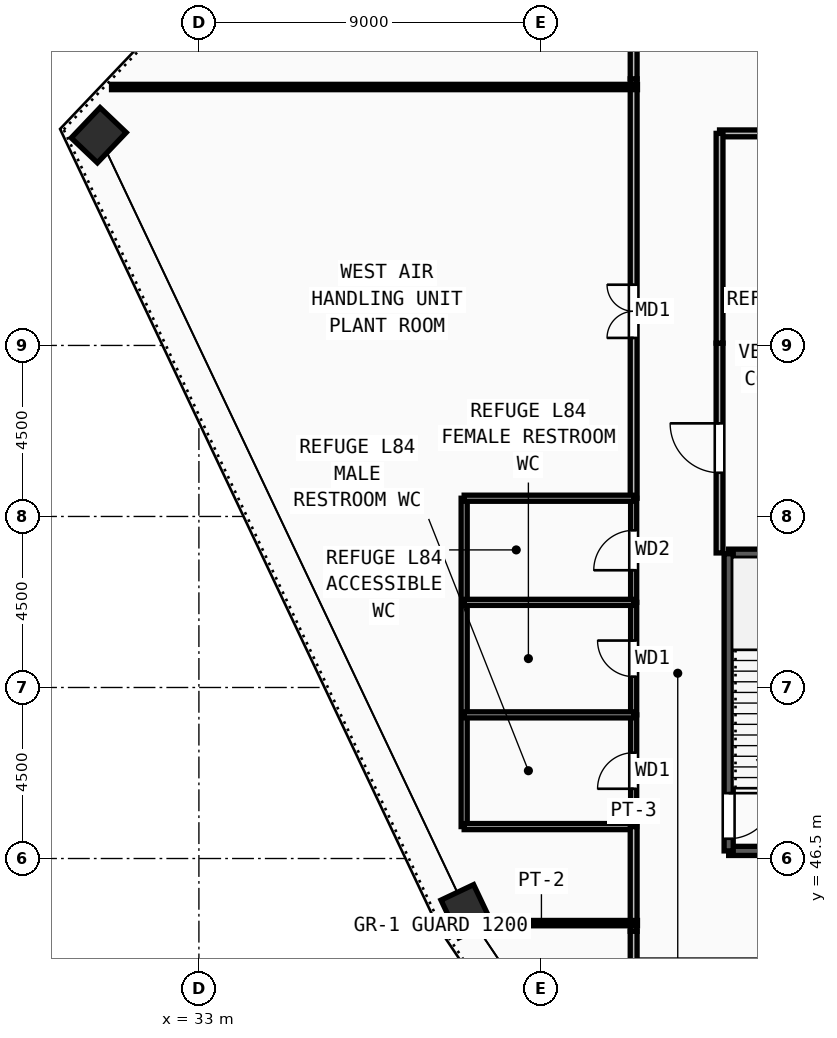
"""IFC4 building model, lengths in metres.
Left out: names, types, materials, properties, quantities, classifications, styles, units other than length and angle.
Written with IfcOpenShell. Run it as: python <this file> out.ifc"""

import sys

from ifc_helpers import new_model, si_unit, direction, frame, frame_2d, origin, origin_2d, place, context, subcontext, project, spatial, rectangle, extrude, source, transform, mapped, element, fill, save


model = new_model("IFC4")
c1 = context("Model", 3, precision=1e-05, world=origin(), true_north=direction((0.0, 1.0)))
c2 = subcontext(c1, "Body", "Model", "MODEL_VIEW")
j1 = project(units=[si_unit("LENGTHUNIT", "METRE"), si_unit("PLANEANGLEUNIT", "RADIAN")], contexts=[c1])
p1 = place(None, origin())
s1 = spatial("IfcSite", under=j1, at=p1, CompositionType="ELEMENT")
p2 = place(p1, origin())
s2 = spatial("IfcBuilding", under=s1, at=p2, CompositionType="ELEMENT")
p3 = place(p2, frame((0.0, 0.0, 324.0)))
s3 = spatial("IfcBuildingStorey", under=s2, at=p3, CompositionType="ELEMENT", Elevation=324.0)
m1 = source(origin(), c2, "Body", "SweptSolid", [
    extrude(rectangle(XDim=1.1, YDim=0.95, at=origin_2d()), origin(), (0.0, 0.0, 1.0), 4.5),
])
for number, where, z_axis, x_axis in (
    (1, (40.035, 45.112, 0.0), (0.0, 0.0, 1.0), (-0.428, 0.904, 0.0)),
    (2, (30.364, 65.532, 0.0), (0.0, 0.0, 1.0), (0.689, 0.724, 0.0)),
):
    element("IfcColumn", number, at=place(p3, frame(where, z_axis=z_axis, x_axis=x_axis)), inside=s3, PredefinedType="COLUMN", context=c2, shape_type="MappedRepresentation", body=[
        mapped(m1, transform((0.0, 0.0, 0.0), x_axis=(1.0, 0.0, 0.0), y_axis=(0.0, 1.0, 0.0), z_axis=(0.0, 0.0, 1.0), scale=1.0)),
    ])
for number, where, z_axis, x_axis in (
    (3, (46.94, 46.7, 0.0), (0.0, 0.0, 1.0), (1.0, 0.0, 0.0)),
    (4, (50.38, 54.52, 0.0), (0.0, 0.0, 1.0), (-1.0, 0.0, 0.0)),
):
    element("IfcWall", number, at=place(p3, frame(where, z_axis=z_axis, x_axis=x_axis)), inside=s3, PredefinedType="SOLIDWALL", context=c2, shape_type="SweptSolid", body=[
        extrude(rectangle(XDim=3.44, YDim=0.24, at=frame_2d((1.72, 0.0))), origin(), (0.0, 0.0, 1.0), 4.32),
    ])
p4 = place(p3, frame((46.94, 54.52, 0.0), z_axis=(0.0, 0.0, 1.0), x_axis=(0.0, -1.0, 0.0)))
e5 = element("IfcWall", 5, at=p4, inside=s3, PredefinedType="SOLIDWALL", context=c2, shape_type="SweptSolid", body=[
    extrude(rectangle(XDim=7.82, YDim=0.24, at=frame_2d((3.91, 0.0))), origin(), (0.0, 0.0, 1.0), 4.32),
])
m2 = source(origin(), c2, "Body", "SweptSolid", [
    extrude(rectangle(XDim=1.2, YDim=2.2, at=frame_2d((0.6, 1.1))), frame((0.0, 0.13, 0.0), z_axis=(0.0, -1.0, 0.0), x_axis=(1.0, 0.0, 0.0)), (0.0, 0.0, 1.0), 0.26),
])
p5 = place(p4, frame((6.3, 0.0, 0.0)))
e6 = element("IfcOpeningElement", 6, at=p5, cuts=e5, PredefinedType="OPENING", context=c2, shape_type="MappedRepresentation", body=[
    mapped(m2, transform((0.0, 0.0, 0.0), x_axis=(1.0, 0.0, 0.0), y_axis=(0.0, 1.0, 0.0), z_axis=(0.0, 0.0, 1.0), scale=1.0)),
])
p6 = place(p3, frame((44.44, 47.34, 0.0), z_axis=(0.0, 0.0, 1.0), x_axis=(0.0, 1.0, 0.0)))
e7 = element("IfcWall", 7, at=p6, inside=s3, PredefinedType="PARTITIONING", context=c2, shape_type="SweptSolid", body=[
    extrude(rectangle(XDim=2.94, YDim=0.16, at=frame_2d((1.47, 0.0))), origin(), (0.0, 0.0, 1.0), 4.32),
])
m3 = source(origin(), c2, "Body", "SweptSolid", [
    extrude(rectangle(XDim=0.95, YDim=2.15, at=frame_2d((0.475, 1.075))), frame((0.0, 0.09, 0.0), z_axis=(0.0, -1.0, 0.0), x_axis=(1.0, 0.0, 0.0)), (0.0, 0.0, 1.0), 0.18),
])
p7 = place(p6, frame((0.995, 0.0, 0.0)))
e8 = element("IfcOpeningElement", 8, at=p7, cuts=e7, PredefinedType="OPENING", context=c2, shape_type="MappedRepresentation", body=[
    mapped(m3, transform((0.0, 0.0, 0.0), x_axis=(1.0, 0.0, 0.0), y_axis=(0.0, 1.0, 0.0), z_axis=(0.0, 0.0, 1.0), scale=1.0)),
])
p8 = place(p3, frame((44.44, 50.28, 0.0), z_axis=(0.0, 0.0, 1.0), x_axis=(0.0, 1.0, 0.0)))
e9 = element("IfcWall", 9, at=p8, inside=s3, PredefinedType="PARTITIONING", context=c2, shape_type="SweptSolid", body=[
    extrude(rectangle(XDim=2.96, YDim=0.16, at=frame_2d((1.48, 0.0))), origin(), (0.0, 0.0, 1.0), 4.32),
])
p9 = place(p8, frame((1.005, 0.0, 0.0)))
e10 = element("IfcOpeningElement", 10, at=p9, cuts=e9, PredefinedType="OPENING", context=c2, shape_type="MappedRepresentation", body=[
    mapped(m3, transform((0.0, 0.0, 0.0), x_axis=(1.0, 0.0, 0.0), y_axis=(0.0, 1.0, 0.0), z_axis=(0.0, 0.0, 1.0), scale=1.0)),
])
p10 = place(p3, frame((44.44, 53.24, 0.0), z_axis=(0.0, 0.0, 1.0), x_axis=(0.0, 1.0, 0.0)))
e11 = element("IfcWall", 11, at=p10, inside=s3, PredefinedType="PARTITIONING", context=c2, shape_type="SweptSolid", body=[
    extrude(rectangle(XDim=2.74, YDim=0.16, at=frame_2d((1.37, 0.0))), origin(), (0.0, 0.0, 1.0), 4.011),
])
m4 = source(origin(), c2, "Body", "SweptSolid", [
    extrude(rectangle(XDim=1.05, YDim=2.15, at=frame_2d((0.525, 1.075))), frame((0.0, 0.09, 0.0), z_axis=(0.0, -1.0, 0.0), x_axis=(1.0, 0.0, 0.0)), (0.0, 0.0, 1.0), 0.18),
])
p11 = place(p10, frame((0.845, 0.0, 0.0)))
e12 = element("IfcOpeningElement", 12, at=p11, cuts=e11, PredefinedType="OPENING", context=c2, shape_type="MappedRepresentation", body=[
    mapped(m4, transform((0.0, 0.0, 0.0), x_axis=(1.0, 0.0, 0.0), y_axis=(0.0, 1.0, 0.0), z_axis=(0.0, 0.0, 1.0), scale=1.0)),
])
p12 = place(p3, frame((46.7, 54.54, 0.0), z_axis=(0.0, 0.0, 1.0), x_axis=(0.0, 1.0, 0.0)))
e13 = element("IfcWall", 13, at=p12, inside=s3, PredefinedType="PARTITIONING", context=c2, shape_type="SweptSolid", body=[
    extrude(rectangle(XDim=5.52, YDim=0.18, at=frame_2d((2.76, 0.0))), origin(), (0.0, 0.0, 1.0), 4.32),
])
m5 = source(origin(), c2, "Body", "SweptSolid", [
    extrude(rectangle(XDim=1.3, YDim=2.2, at=frame_2d((0.65, 1.1))), frame((0.0, 0.1, 0.0), z_axis=(0.0, -1.0, 0.0), x_axis=(1.0, 0.0, 0.0)), (0.0, 0.0, 1.0), 0.2),
])
p13 = place(p12, frame((2.11, 0.0, 0.0)))
e14 = element("IfcOpeningElement", 14, at=p13, cuts=e13, PredefinedType="OPENING", context=c2, shape_type="MappedRepresentation", body=[
    mapped(m5, transform((0.0, 0.0, 0.0), x_axis=(1.0, 0.0, 0.0), y_axis=(0.0, 1.0, 0.0), z_axis=(0.0, 0.0, 1.0), scale=1.0)),
])
p14 = place(p3, frame((44.44, 55.98, 0.0), z_axis=(0.0, 0.0, 1.0), x_axis=(0.0, 1.0, 0.0)))
e15 = element("IfcWall", 15, at=p14, inside=s3, PredefinedType="PARTITIONING", context=c2, shape_type="SweptSolid", body=[
    extrude(rectangle(XDim=11.035, YDim=0.18, at=frame_2d((5.518, 0.0))), origin(), (0.0, 0.0, 1.0), 4.32),
])
m6 = source(origin(), c2, "Body", "SweptSolid", [
    extrude(rectangle(XDim=1.4, YDim=2.25, at=frame_2d((0.7, 1.125))), frame((0.0, 0.1, 0.0), z_axis=(0.0, -1.0, 0.0), x_axis=(1.0, 0.0, 0.0)), (0.0, 0.0, 1.0), 0.2),
])
p15 = place(p14, frame((4.218, 0.0, 0.0)))
e16 = element("IfcOpeningElement", 16, at=p15, cuts=e15, PredefinedType="OPENING", context=c2, shape_type="MappedRepresentation", body=[
    mapped(m6, transform((0.0, 0.0, 0.0), x_axis=(1.0, 0.0, 0.0), y_axis=(0.0, 1.0, 0.0), z_axis=(0.0, 0.0, 1.0), scale=1.0)),
])
p16 = place(p3, frame((39.98, 47.34, 0.0), z_axis=(0.0, 0.0, 1.0), x_axis=(0.0, 1.0, 0.0)))
e17 = element("IfcWall", 17, at=p16, inside=s3, PredefinedType="PARTITIONING", context=c2, shape_type="SweptSolid", body=[
    extrude(rectangle(XDim=8.64, YDim=0.16, at=frame_2d((4.32, 0.0))), origin(), (0.0, 0.0, 1.0), 4.32),
])
for number, where, z_axis, x_axis in (
    (18, (39.98, 47.34, 0.0), (0.0, 0.0, 1.0), (1.0, 0.0, 0.0)),
    (19, (39.98, 50.28, 0.0), (0.0, 0.0, 1.0), (1.0, 0.0, 0.0)),
    (20, (39.98, 53.24, 0.0), (0.0, 0.0, 1.0), (1.0, 0.0, 0.0)),
    (21, (39.98, 55.98, 0.0), (0.0, 0.0, 1.0), (1.0, 0.0, 0.0)),
):
    element("IfcWall", number, at=place(p3, frame(where, z_axis=z_axis, x_axis=x_axis)), inside=s3, PredefinedType="PARTITIONING", context=c2, shape_type="SweptSolid", body=[
        extrude(rectangle(XDim=4.46, YDim=0.16, at=frame_2d((2.23, 0.0))), origin(), (0.0, 0.0, 1.0), 4.32),
    ])
p17 = place(p3, frame((46.7, 65.58, 0.0), z_axis=(0.0, 0.0, 1.0), x_axis=(1.0, 0.0, 0.0)))
e22 = element("IfcWall", 22, at=p17, inside=s3, PredefinedType="PARTITIONING", context=c2, shape_type="SweptSolid", body=[
    extrude(rectangle(XDim=3.84, YDim=0.18, at=frame_2d((1.92, 0.0))), origin(), (0.0, 0.0, 1.0), 4.32),
])
p18 = place(p3, frame((46.7, 60.06, 0.0), z_axis=(0.0, 0.0, 1.0), x_axis=(0.0, 1.0, 0.0)))
e23 = element("IfcWall", 23, at=p18, inside=s3, PredefinedType="PARTITIONING", context=c2, shape_type="SweptSolid", body=[
    extrude(rectangle(XDim=5.52, YDim=0.18, at=frame_2d((2.76, 0.0))), origin(), (0.0, 0.0, 1.0), 4.32),
])
p19 = place(p3, frame((44.44, 67.015, 0.0), z_axis=(0.0, 0.0, 1.0), x_axis=(0.0, 1.0, 0.0)))
e24 = element("IfcWall", 24, at=p19, inside=s3, PredefinedType="PARTITIONING", context=c2, shape_type="SweptSolid", body=[
    extrude(rectangle(XDim=0.965, YDim=0.18, at=frame_2d((0.482, 0.0))), origin(), (0.0, 0.0, 1.0), 4.32),
])
p20 = place(p3, frame((44.44, 44.585, 0.0), z_axis=(0.0, 0.0, 1.0), x_axis=(0.0, 1.0, 0.0)))
e25 = element("IfcWall", 25, at=p20, inside=s3, PredefinedType="PARTITIONING", context=c2, shape_type="SweptSolid", body=[
    extrude(rectangle(XDim=2.755, YDim=0.18, at=frame_2d((1.377, 0.0))), origin(), (0.0, 0.0, 1.0), 4.32),
])
p21 = place(p3, frame((44.44, 43.67, 0.0), z_axis=(0.0, 0.0, 1.0), x_axis=(0.0, 1.0, 0.0)))
e26 = element("IfcWall", 26, at=p21, inside=s3, PredefinedType="PARTITIONING", context=c2, shape_type="SweptSolid", body=[
    extrude(rectangle(XDim=0.915, YDim=0.18, at=frame_2d((0.458, 0.0))), origin(), (0.0, 0.0, 1.0), 4.32),
])
p22 = place(p3, frame((44.54, 44.8, 0.0), z_axis=(0.0, 0.0, 1.0), x_axis=(-1.0, 0.0, 0.0)))
e27 = element("IfcWall", 27, at=p22, inside=s3, PredefinedType="PARTITIONING", context=c2, shape_type="SweptSolid", body=[
    extrude(rectangle(XDim=5.054, YDim=0.14, at=frame_2d((2.527, 0.0))), origin(), (0.0, 0.0, 1.0), 4.32),
])
p23 = place(p3, frame((44.54, 66.8, 0.0), z_axis=(0.0, 0.0, 1.0), x_axis=(-1.0, 0.0, 0.0)))
e28 = element("IfcWall", 28, at=p23, inside=s3, PredefinedType="PARTITIONING", context=c2, shape_type="SweptSolid", body=[
    extrude(rectangle(XDim=13.839, YDim=0.14, at=frame_2d((6.919, 0.0))), origin(), (0.0, 0.0, 1.0), 4.32),
])
m7 = source(origin(), c2, "Body", "SweptSolid", [
    extrude(rectangle(XDim=1.2, YDim=2.2, at=frame_2d((0.6, 1.1))), frame((0.0, 0.025, 0.0), z_axis=(0.0, -1.0, 0.0), x_axis=(1.0, 0.0, 0.0)), (0.0, 0.0, 1.0), 0.05),
])
p24 = place(p5, origin())
e29 = element("IfcDoor", 29, at=p24, inside=s3, OperationType="SINGLE_SWING_LEFT", PredefinedType="DOOR", context=c2, shape_type="MappedRepresentation", body=[
    mapped(m7, transform((0.0, 0.0, 0.0), x_axis=(1.0, 0.0, 0.0), y_axis=(0.0, 1.0, 0.0), z_axis=(0.0, 0.0, 1.0), scale=1.0)),
])
fill(e6, e29)
m8 = source(origin(), c2, "Body", "SweptSolid", [
    extrude(rectangle(XDim=0.95, YDim=2.15, at=frame_2d((0.475, 1.075))), frame((0.0, 0.025, 0.0), z_axis=(0.0, -1.0, 0.0), x_axis=(1.0, 0.0, 0.0)), (0.0, 0.0, 1.0), 0.05),
])
p25 = place(p7, origin())
e30 = element("IfcDoor", 30, at=p25, inside=s3, OperationType="SINGLE_SWING_LEFT", PredefinedType="DOOR", context=c2, shape_type="MappedRepresentation", body=[
    mapped(m8, transform((0.0, 0.0, 0.0), x_axis=(1.0, 0.0, 0.0), y_axis=(0.0, 1.0, 0.0), z_axis=(0.0, 0.0, 1.0), scale=1.0)),
])
fill(e8, e30)
p26 = place(p9, origin())
e31 = element("IfcDoor", 31, at=p26, inside=s3, OperationType="SINGLE_SWING_RIGHT", PredefinedType="DOOR", context=c2, shape_type="MappedRepresentation", body=[
    mapped(m8, transform((0.0, 0.0, 0.0), x_axis=(1.0, 0.0, 0.0), y_axis=(0.0, 1.0, 0.0), z_axis=(0.0, 0.0, 1.0), scale=1.0)),
])
fill(e10, e31)
m9 = source(origin(), c2, "Body", "SweptSolid", [
    extrude(rectangle(XDim=1.05, YDim=2.15, at=frame_2d((0.525, 1.075))), frame((0.0, 0.025, 0.0), z_axis=(0.0, -1.0, 0.0), x_axis=(1.0, 0.0, 0.0)), (0.0, 0.0, 1.0), 0.05),
])
p27 = place(p11, origin())
e32 = element("IfcDoor", 32, at=p27, inside=s3, OperationType="SINGLE_SWING_LEFT", PredefinedType="DOOR", context=c2, shape_type="MappedRepresentation", body=[
    mapped(m9, transform((0.0, 0.0, 0.0), x_axis=(1.0, 0.0, 0.0), y_axis=(0.0, 1.0, 0.0), z_axis=(0.0, 0.0, 1.0), scale=1.0)),
])
fill(e12, e32)
m10 = source(origin(), c2, "Body", "SweptSolid", [
    extrude(rectangle(XDim=1.3, YDim=2.2, at=frame_2d((0.65, 1.1))), frame((0.0, 0.025, 0.0), z_axis=(0.0, -1.0, 0.0), x_axis=(1.0, 0.0, 0.0)), (0.0, 0.0, 1.0), 0.05),
])
p28 = place(p13, origin())
e33 = element("IfcDoor", 33, at=p28, inside=s3, OperationType="SINGLE_SWING_RIGHT", PredefinedType="DOOR", context=c2, shape_type="MappedRepresentation", body=[
    mapped(m10, transform((0.0, 0.0, 0.0), x_axis=(1.0, 0.0, 0.0), y_axis=(0.0, 1.0, 0.0), z_axis=(0.0, 0.0, 1.0), scale=1.0)),
])
fill(e14, e33)
m11 = source(origin(), c2, "Body", "SweptSolid", [
    extrude(rectangle(XDim=1.4, YDim=2.25, at=frame_2d((0.7, 1.125))), frame((0.0, 0.025, 0.0), z_axis=(0.0, -1.0, 0.0), x_axis=(1.0, 0.0, 0.0)), (0.0, 0.0, 1.0), 0.05),
])
p29 = place(p15, origin())
e34 = element("IfcDoor", 34, at=p29, inside=s3, OperationType="DOUBLE_DOOR_SINGLE_SWING", PredefinedType="DOOR", context=c2, shape_type="MappedRepresentation", body=[
    mapped(m11, transform((0.0, 0.0, 0.0), x_axis=(1.0, 0.0, 0.0), y_axis=(0.0, 1.0, 0.0), z_axis=(0.0, 0.0, 1.0), scale=1.0)),
])
fill(e16, e34)
save(model, sys.argv[1])
